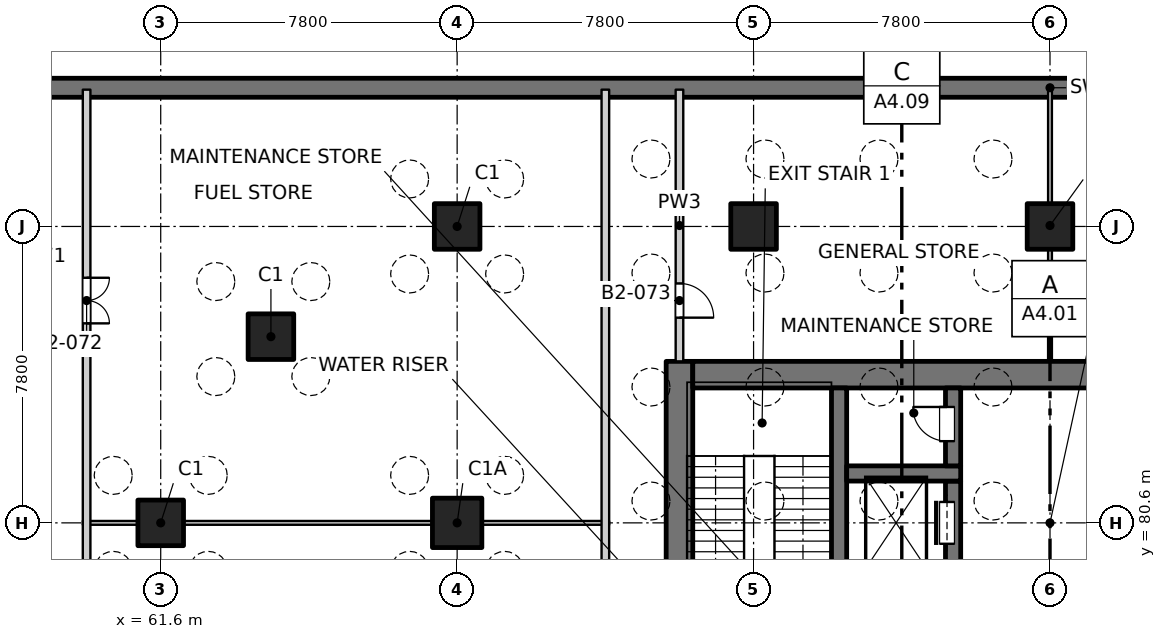
"""IFC4 building model, lengths in metres.
Left out: names, types, materials, properties, quantities, classifications, styles, units other than length and angle.
Written with IfcOpenShell. Run it as: python <this file> out.ifc"""

import sys

from ifc_helpers import new_model, si_unit, direction, frame, frame_2d, origin, origin_2d, place, context, subcontext, project, spatial, rectangle, extrude, element, fill, save


model = new_model("IFC4")
c1 = context("Model", 3, precision=1e-05, world=origin(), true_north=direction((0.0, 1.0)))
c2 = subcontext(c1, "Body", "Model", "MODEL_VIEW")
j1 = project(units=[si_unit("LENGTHUNIT", "METRE"), si_unit("PLANEANGLEUNIT", "RADIAN")], contexts=[c1])
p1 = place(None, origin())
s1 = spatial("IfcSite", under=j1, at=p1, CompositionType="ELEMENT")
p2 = place(p1, origin())
s2 = spatial("IfcBuilding", under=s1, at=p2, CompositionType="ELEMENT")
p3 = place(p2, frame((0.0, 0.0, -9.0)))
s3 = spatial("IfcBuildingStorey", under=s2, at=p3, CompositionType="ELEMENT", Elevation=-9.0)
p4 = place(p3, frame((42.6, 92.05, -0.5), z_axis=(0.0, 0.0, 1.0), x_axis=(1.0, 0.0, 0.0)))
e1 = element("IfcWall", 1, at=p4, inside=s3, PredefinedType="SOLIDWALL", context=c2, shape_type="SweptSolid", body=[
    extrude(rectangle(XDim=84.8, YDim=0.5, at=frame_2d((42.4, 0.0))), origin(), (0.0, 0.0, 1.0), 4.65),
])
for number, where, z_axis, x_axis in (
    (2, (64.5, 85.5, -0.5), (0.0, 0.0, 1.0), (1.0, 0.0, 0.0)),
    (3, (69.4, 88.4, -0.5), (0.0, 0.0, 1.0), (1.0, 0.0, 0.0)),
    (4, (77.2, 88.4, -0.5), (0.0, 0.0, 1.0), (1.0, 0.0, 0.0)),
    (5, (85.0, 88.4, -0.5), (0.0, 0.0, 1.0), (1.0, 0.0, 0.0)),
    (6, (61.6, 80.6, -0.5), (0.0, 0.0, 1.0), (1.0, 0.0, 0.0)),
):
    element("IfcColumn", number, at=place(p3, frame(where, z_axis=z_axis, x_axis=x_axis)), inside=s3, PredefinedType="COLUMN", context=c2, shape_type="SweptSolid", body=[
        extrude(rectangle(XDim=1.2, YDim=1.2, at=origin_2d()), origin(), (0.0, 0.0, 1.0), 4.65),
    ])
p5 = place(p3, frame((69.4, 80.6, -0.5), z_axis=(0.0, 0.0, 1.0), x_axis=(1.0, 0.0, 0.0)))
e7 = element("IfcColumn", 7, at=p5, inside=s3, PredefinedType="COLUMN", context=c2, shape_type="SweptSolid", body=[
    extrude(rectangle(XDim=1.3, YDim=1.3, at=origin_2d()), origin(), (0.0, 0.0, 1.0), 4.65),
])
p6 = place(p3, frame((75.25, 77.3, -0.5), z_axis=(0.0, 0.0, 1.0), x_axis=(0.0, 1.0, 0.0)))
e8 = element("IfcWall", 8, at=p6, inside=s3, PredefinedType="SOLIDWALL", context=c2, shape_type="SweptSolid", body=[
    extrude(rectangle(XDim=7.55, YDim=0.7, at=frame_2d((3.775, 0.0))), origin(), (0.0, 0.0, 1.0), 4.65),
])
p7 = place(p6, frame((0.3, 0.0, 0.5)))
e9 = element("IfcOpeningElement", 9, at=p7, cuts=e8, PredefinedType="OPENING", context=c2, shape_type="SweptSolid", body=[
    extrude(rectangle(XDim=1.2, YDim=2.1, at=frame_2d((0.6, 1.05))), frame((0.0, 0.36, 0.0), z_axis=(0.0, -1.0, 0.0), x_axis=(1.0, 0.0, 0.0)), (0.0, 0.0, 1.0), 0.72),
])
p8 = place(p3, frame((75.6, 84.5, -0.5), z_axis=(0.0, 0.0, 1.0), x_axis=(1.0, 0.0, 0.0)))
e10 = element("IfcWall", 10, at=p8, inside=s3, PredefinedType="SOLIDWALL", context=c2, shape_type="SweptSolid", body=[
    extrude(rectangle(XDim=18.8, YDim=0.7, at=frame_2d((9.4, 0.0))), origin(), (0.0, 0.0, 1.0), 4.65),
])
p9 = place(p3, frame((79.45, 77.3, -0.5), z_axis=(0.0, 0.0, 1.0), x_axis=(0.0, 1.0, 0.0)))
e11 = element("IfcWall", 11, at=p9, inside=s3, PredefinedType="SOLIDWALL", context=c2, shape_type="SweptSolid", body=[
    extrude(rectangle(XDim=6.85, YDim=0.4, at=frame_2d((3.425, 0.0))), origin(), (0.0, 0.0, 1.0), 4.65),
])
p10 = place(p3, frame((82.45, 79.5, -0.5), z_axis=(0.0, 0.0, 1.0), x_axis=(0.0, 1.0, 0.0)))
e12 = element("IfcWall", 12, at=p10, inside=s3, PredefinedType="SOLIDWALL", context=c2, shape_type="SweptSolid", body=[
    extrude(rectangle(XDim=2.2, YDim=0.4, at=frame_2d((1.1, 0.0))), origin(), (0.0, 0.0, 1.0), 4.65),
])
p11 = place(p10, frame((0.55, 0.0, 0.5)))
e13 = element("IfcOpeningElement", 13, at=p11, cuts=e12, PredefinedType="OPENING", context=c2, shape_type="SweptSolid", body=[
    extrude(rectangle(XDim=1.1, YDim=2.1, at=frame_2d((0.55, 1.05))), frame((0.0, 0.21, 0.0), z_axis=(0.0, -1.0, 0.0), x_axis=(1.0, 0.0, 0.0)), (0.0, 0.0, 1.0), 0.42),
])
p12 = place(p3, frame((79.65, 81.9, -0.5), z_axis=(0.0, 0.0, 1.0), x_axis=(1.0, 0.0, 0.0)))
e14 = element("IfcWall", 14, at=p12, inside=s3, PredefinedType="SOLIDWALL", context=c2, shape_type="SweptSolid", body=[
    extrude(rectangle(XDim=3.0, YDim=0.4, at=frame_2d((1.5, 0.0))), origin(), (0.0, 0.0, 1.0), 4.65),
])
p13 = place(p3, frame((82.45, 82.1, -0.5), z_axis=(0.0, 0.0, 1.0), x_axis=(0.0, 1.0, 0.0)))
e15 = element("IfcWall", 15, at=p13, inside=s3, PredefinedType="SOLIDWALL", context=c2, shape_type="SweptSolid", body=[
    extrude(rectangle(XDim=2.05, YDim=0.4, at=frame_2d((1.025, 0.0))), origin(), (0.0, 0.0, 1.0), 4.65),
])
p14 = place(p13, frame((0.65, 0.0, 0.5)))
e16 = element("IfcOpeningElement", 16, at=p14, cuts=e15, PredefinedType="OPENING", context=c2, shape_type="SweptSolid", body=[
    extrude(rectangle(XDim=0.9, YDim=2.1, at=frame_2d((0.45, 1.05))), frame((0.0, 0.21, 0.0), z_axis=(0.0, -1.0, 0.0), x_axis=(1.0, 0.0, 0.0)), (0.0, 0.0, 1.0), 0.42),
])
p15 = place(p3, frame((59.55, 80.6, 0.0), z_axis=(0.0, 0.0, 1.0), x_axis=(1.0, 0.0, 0.0)))
e17 = element("IfcWall", 17, at=p15, inside=s3, PredefinedType="PARTITIONING", context=c2, shape_type="SweptSolid", body=[
    extrude(rectangle(XDim=13.85, YDim=0.1, at=frame_2d((6.925, 0.0))), origin(), (0.0, 0.0, 1.0), 4.15),
])
p16 = place(p3, frame((59.65, 55.35, 0.0), z_axis=(0.0, 0.0, 1.0), x_axis=(0.0, 1.0, 0.0)))
e18 = element("IfcWall", 18, at=p16, inside=s3, PredefinedType="PARTITIONING", context=c2, shape_type="SweptSolid", body=[
    extrude(rectangle(XDim=36.65, YDim=0.2, at=frame_2d((18.325, 0.0))), origin(), (0.0, 0.0, 1.0), 4.15),
])
p17 = place(p16, frame((3.2, 0.0, 0.0)))
e19 = element("IfcOpeningElement", 19, at=p17, cuts=e18, PredefinedType="OPENING", context=c2, shape_type="SweptSolid", body=[
    extrude(rectangle(XDim=1.2, YDim=2.1, at=frame_2d((0.6, 1.05))), frame((0.0, 0.11, 0.0), z_axis=(0.0, -1.0, 0.0), x_axis=(1.0, 0.0, 0.0)), (0.0, 0.0, 1.0), 0.22),
])
p18 = place(p16, frame((11.975, 0.0, 0.0)))
e20 = element("IfcOpeningElement", 20, at=p18, cuts=e18, PredefinedType="OPENING", context=c2, shape_type="SweptSolid", body=[
    extrude(rectangle(XDim=1.2, YDim=2.1, at=frame_2d((0.6, 1.05))), frame((0.0, 0.11, 0.0), z_axis=(0.0, -1.0, 0.0), x_axis=(1.0, 0.0, 0.0)), (0.0, 0.0, 1.0), 0.22),
])
p19 = place(p16, frame((20.75, 0.0, 0.0)))
e21 = element("IfcOpeningElement", 21, at=p19, cuts=e18, PredefinedType="OPENING", context=c2, shape_type="SweptSolid", body=[
    extrude(rectangle(XDim=1.2, YDim=2.1, at=frame_2d((0.6, 1.05))), frame((0.0, 0.11, 0.0), z_axis=(0.0, -1.0, 0.0), x_axis=(1.0, 0.0, 0.0)), (0.0, 0.0, 1.0), 0.22),
])
p20 = place(p16, frame((30.5, 0.0, 0.0)))
e22 = element("IfcOpeningElement", 22, at=p20, cuts=e18, PredefinedType="OPENING", context=c2, shape_type="SweptSolid", body=[
    extrude(rectangle(XDim=1.2, YDim=2.1, at=frame_2d((0.6, 1.05))), frame((0.0, 0.11, 0.0), z_axis=(0.0, -1.0, 0.0), x_axis=(1.0, 0.0, 0.0)), (0.0, 0.0, 1.0), 0.22),
])
p21 = place(p3, frame((73.3, 55.35, 0.0), z_axis=(0.0, 0.0, 1.0), x_axis=(0.0, 1.0, 0.0)))
e23 = element("IfcWall", 23, at=p21, inside=s3, PredefinedType="PARTITIONING", context=c2, shape_type="SweptSolid", body=[
    extrude(rectangle(XDim=36.65, YDim=0.2, at=frame_2d((18.325, 0.0))), origin(), (0.0, 0.0, 1.0), 4.15),
])
p22 = place(p3, frame((75.25, 84.85, 0.0), z_axis=(0.0, 0.0, 1.0), x_axis=(0.0, 1.0, 0.0)))
e24 = element("IfcWall", 24, at=p22, inside=s3, PredefinedType="PARTITIONING", context=c2, shape_type="SweptSolid", body=[
    extrude(rectangle(XDim=7.15, YDim=0.2, at=frame_2d((3.575, 0.0))), origin(), (0.0, 0.0, 1.0), 4.15),
])
p23 = place(p22, frame((1.15, 0.0, 0.0)))
e25 = element("IfcOpeningElement", 25, at=p23, cuts=e24, PredefinedType="OPENING", context=c2, shape_type="SweptSolid", body=[
    extrude(rectangle(XDim=0.9, YDim=2.1, at=frame_2d((0.45, 1.05))), frame((0.0, 0.11, 0.0), z_axis=(0.0, -1.0, 0.0), x_axis=(1.0, 0.0, 0.0)), (0.0, 0.0, 1.0), 0.22),
])
p24 = place(p3, frame((85.0, 84.85, 0.0), z_axis=(0.0, 0.0, 1.0), x_axis=(0.0, 1.0, 0.0)))
e26 = element("IfcWall", 26, at=p24, inside=s3, PredefinedType="PARTITIONING", context=c2, shape_type="SweptSolid", body=[
    extrude(rectangle(XDim=7.15, YDim=0.1, at=frame_2d((3.575, 0.0))), origin(), (0.0, 0.0, 1.0), 4.15),
])
p25 = place(p11, origin())
e27 = element("IfcDoor", 27, at=p25, inside=s3, OperationType="SLIDING_TO_LEFT", PredefinedType="DOOR", context=c2, shape_type="SweptSolid", body=[
    extrude(rectangle(XDim=1.1, YDim=2.1, at=frame_2d((0.55, 1.05))), frame((0.0, 0.185, 0.0), z_axis=(0.0, -1.0, 0.0), x_axis=(1.0, 0.0, 0.0)), (0.0, 0.0, 1.0), 0.05),
])
fill(e13, e27)
p26 = place(p14, origin())
e28 = element("IfcDoor", 28, at=p26, inside=s3, OperationType="SINGLE_SWING_RIGHT", PredefinedType="DOOR", context=c2, shape_type="SweptSolid", body=[
    extrude(rectangle(XDim=0.9, YDim=2.1, at=frame_2d((0.45, 1.05))), frame((0.0, 0.185, 0.0), z_axis=(0.0, -1.0, 0.0), x_axis=(1.0, 0.0, 0.0)), (0.0, 0.0, 1.0), 0.05),
])
fill(e16, e28)
p27 = place(p20, origin())
e29 = element("IfcDoor", 29, at=p27, inside=s3, OperationType="DOUBLE_DOOR_SINGLE_SWING", PredefinedType="DOOR", context=c2, shape_type="SweptSolid", body=[
    extrude(rectangle(XDim=1.2, YDim=2.1, at=frame_2d((0.6, 1.05))), frame((0.0, 0.025, 0.0), z_axis=(0.0, -1.0, 0.0), x_axis=(1.0, 0.0, 0.0)), (0.0, 0.0, 1.0), 0.05),
])
fill(e22, e29)
p28 = place(p23, origin())
e30 = element("IfcDoor", 30, at=p28, inside=s3, OperationType="SINGLE_SWING_RIGHT", PredefinedType="DOOR", context=c2, shape_type="SweptSolid", body=[
    extrude(rectangle(XDim=0.9, YDim=2.1, at=frame_2d((0.45, 1.05))), frame((0.0, 0.025, 0.0), z_axis=(0.0, -1.0, 0.0), x_axis=(1.0, 0.0, 0.0)), (0.0, 0.0, 1.0), 0.05),
])
fill(e25, e30)
save(model, sys.argv[1])
